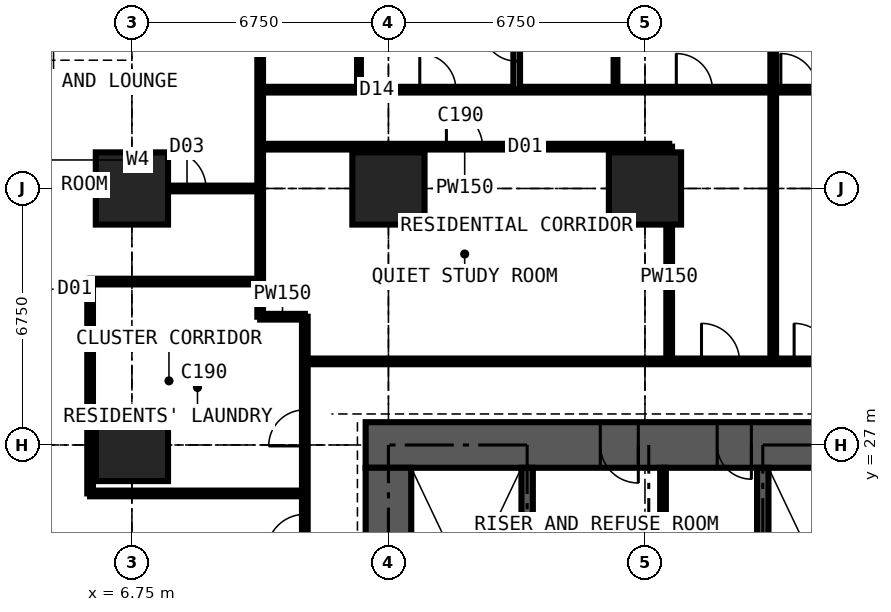
"""IFC4 building model, lengths in metres.
Left out: names, types, materials, properties, quantities, classifications, styles, units other than length and angle.
Written with IfcOpenShell. Run it as: python <this file> out.ifc"""

import sys

from ifc_helpers import new_model, si_unit, direction, frame, frame_2d, origin, origin_2d, place, context, subcontext, project, spatial, rectangle, extrude, element, fill, save


model = new_model("IFC4")
c1 = context("Model", 3, precision=1e-05, world=origin(), true_north=direction((0.0, 1.0)))
c2 = subcontext(c1, "Body", "Model", "MODEL_VIEW")
j1 = project(units=[si_unit("LENGTHUNIT", "METRE"), si_unit("PLANEANGLEUNIT", "RADIAN")], contexts=[c1])
p1 = place(None, origin())
s1 = spatial("IfcSite", under=j1, at=p1, CompositionType="ELEMENT")
p2 = place(p1, origin())
s2 = spatial("IfcBuilding", under=s1, at=p2, CompositionType="ELEMENT")
p3 = place(p2, frame((0.0, 0.0, 21.6)))
s3 = spatial("IfcBuildingStorey", under=s2, at=p3, CompositionType="ELEMENT", Elevation=21.6)
for number, where, z_axis, x_axis in (
    (1, (6.75, 27.0, 0.0), (0.0, 0.0, 1.0), (1.0, 0.0, 0.0)),
    (2, (6.75, 33.75, 0.0), (0.0, 0.0, 1.0), (1.0, 0.0, 0.0)),
    (3, (13.5, 33.75, 0.0), (0.0, 0.0, 1.0), (1.0, 0.0, 0.0)),
    (4, (20.25, 33.75, 0.0), (0.0, 0.0, 1.0), (1.0, 0.0, 0.0)),
):
    element("IfcColumn", number, at=place(p3, frame(where, z_axis=z_axis, x_axis=x_axis)), inside=s3, PredefinedType="COLUMN", context=c2, shape_type="SweptSolid", body=[
        extrude(rectangle(XDim=1.9, YDim=1.9, at=origin_2d()), origin(), (0.0, 0.0, 1.0), 3.6),
    ])
p4 = place(p3, frame((27.6, 27.0, 0.0), z_axis=(0.0, 0.0, 1.0), x_axis=(-1.0, 0.0, 0.0)))
e5 = element("IfcWall", 5, at=p4, inside=s3, PredefinedType="SHEAR", context=c2, shape_type="SweptSolid", body=[
    extrude(rectangle(XDim=14.7, YDim=1.2, at=frame_2d((7.35, 0.0))), origin(), (0.0, 0.0, 1.0), 3.6),
])
p5 = place(p4, frame((4.55, 0.0, 0.0)))
e6 = element("IfcOpeningElement", 6, at=p5, cuts=e5, PredefinedType="OPENING", context=c2, shape_type="SweptSolid", body=[
    extrude(rectangle(XDim=0.9, YDim=2.2, at=frame_2d((0.45, 1.1))), frame((0.0, 0.61, 0.0), z_axis=(0.0, -1.0, 0.0), x_axis=(1.0, 0.0, 0.0)), (0.0, 0.0, 1.0), 1.22),
])
p6 = place(p4, frame((7.525, 0.0, 0.0)))
e7 = element("IfcOpeningElement", 7, at=p6, cuts=e5, PredefinedType="OPENING", context=c2, shape_type="SweptSolid", body=[
    extrude(rectangle(XDim=1.0, YDim=2.2, at=frame_2d((0.5, 1.1))), frame((0.0, 0.61, 0.0), z_axis=(0.0, -1.0, 0.0), x_axis=(1.0, 0.0, 0.0)), (0.0, 0.0, 1.0), 1.22),
])
p7 = place(p3, frame((13.5, 26.4, 0.0), z_axis=(0.0, 0.0, 1.0), x_axis=(0.0, -1.0, 0.0)))
e8 = element("IfcWall", 8, at=p7, inside=s3, PredefinedType="SHEAR", context=c2, shape_type="SweptSolid", body=[
    extrude(rectangle(XDim=12.3, YDim=1.2, at=frame_2d((6.15, 0.0))), origin(), (0.0, 0.0, 1.0), 3.6),
])
p8 = place(p7, frame((7.45, 0.0, 0.0)))
e9 = element("IfcOpeningElement", 9, at=p8, cuts=e8, PredefinedType="OPENING", context=c2, shape_type="SweptSolid", body=[
    extrude(rectangle(XDim=1.2, YDim=2.2, at=frame_2d((0.6, 1.1))), frame((0.0, 0.61, 0.0), z_axis=(0.0, -1.0, 0.0), x_axis=(1.0, 0.0, 0.0)), (0.0, 0.0, 1.0), 1.22),
])
for number, where, z_axis, x_axis in (
    (10, (17.15, 20.3, 0.0), (0.0, 0.0, 1.0), (0.0, 1.0, 0.0)),
    (11, (23.35, 20.3, 0.0), (0.0, 0.0, 1.0), (0.0, 1.0, 0.0)),
):
    element("IfcWall", number, at=place(p3, frame(where, z_axis=z_axis, x_axis=x_axis)), inside=s3, PredefinedType="SHEAR", context=c2, shape_type="SweptSolid", body=[
        extrude(rectangle(XDim=6.1, YDim=0.3, at=frame_2d((3.05, 0.0))), origin(), (0.0, 0.0, 1.0), 3.6),
    ])
p9 = place(p3, frame((20.725, 23.4, 0.0), z_axis=(0.0, 0.0, 1.0), x_axis=(0.0, 1.0, 0.0)))
e12 = element("IfcWall", 12, at=p9, inside=s3, PredefinedType="PARTITIONING", context=c2, shape_type="SweptSolid", body=[
    extrude(rectangle(XDim=3.0, YDim=0.15, at=frame_2d((1.5, 0.0))), origin(), (0.0, 0.0, 1.0), 3.375),
])
p10 = place(p3, frame((-0.734, 33.75, 0.0), z_axis=(0.0, 0.0, 1.0), x_axis=(1.0, 0.0, 0.0)))
e13 = element("IfcWall", 13, at=p10, inside=s3, PredefinedType="PARTITIONING", context=c2, shape_type="SweptSolid", body=[
    extrude(rectangle(XDim=10.859, YDim=0.15, at=frame_2d((5.429, 0.0))), origin(), (0.0, 0.0, 1.0), 2.877),
])
p11 = place(p10, frame((8.434, 0.0, 0.0)))
e14 = element("IfcOpeningElement", 14, at=p11, cuts=e13, PredefinedType="OPENING", context=c2, shape_type="SweptSolid", body=[
    extrude(rectangle(XDim=1.0, YDim=2.2, at=frame_2d((0.5, 1.1))), frame((0.0, 0.085, 0.0), z_axis=(0.0, -1.0, 0.0), x_axis=(1.0, 0.0, 0.0)), (0.0, 0.0, 1.0), 0.17),
])
p12 = place(p3, frame((5.65, 25.725, 0.0), z_axis=(0.0, 0.0, 1.0), x_axis=(0.0, 1.0, 0.0)))
e15 = element("IfcWall", 15, at=p12, inside=s3, PredefinedType="PARTITIONING", context=c2, shape_type="SweptSolid", body=[
    extrude(rectangle(XDim=5.575, YDim=0.15, at=frame_2d((2.788, 0.0))), origin(), (0.0, 0.0, 1.0), 3.375),
])
p13 = place(p3, frame((5.65, 25.725, 0.0), z_axis=(0.0, 0.0, 1.0), x_axis=(1.0, 0.0, 0.0)))
e16 = element("IfcWall", 16, at=p13, inside=s3, PredefinedType="PARTITIONING", context=c2, shape_type="SweptSolid", body=[
    extrude(rectangle(XDim=5.65, YDim=0.15, at=frame_2d((2.825, 0.0))), origin(), (0.0, 0.0, 1.0), 3.375),
])
p14 = place(p3, frame((5.65, 31.3, 0.0), z_axis=(0.0, 0.0, 1.0), x_axis=(1.0, 0.0, 0.0)))
e17 = element("IfcWall", 17, at=p14, inside=s3, PredefinedType="PARTITIONING", context=c2, shape_type="SweptSolid", body=[
    extrude(rectangle(XDim=4.475, YDim=0.15, at=frame_2d((2.238, 0.0))), origin(), (0.0, 0.0, 1.0), 3.375),
])
p15 = place(p3, frame((10.125, 30.375, 0.0), z_axis=(0.0, 0.0, 1.0), x_axis=(0.0, 1.0, 0.0)))
e18 = element("IfcWall", 18, at=p15, inside=s3, PredefinedType="PARTITIONING", context=c2, shape_type="SweptSolid", body=[
    extrude(rectangle(XDim=10.859, YDim=0.15, at=frame_2d((5.429, 0.0))), origin(), (0.0, 0.0, 1.0), 3.375),
])
p16 = place(p3, frame((10.125, 30.375, 0.0), z_axis=(0.0, 0.0, 1.0), x_axis=(1.0, 0.0, 0.0)))
e19 = element("IfcWall", 19, at=p16, inside=s3, PredefinedType="PARTITIONING", context=c2, shape_type="SweptSolid", body=[
    extrude(rectangle(XDim=1.175, YDim=0.15, at=frame_2d((0.587, 0.0))), origin(), (0.0, 0.0, 1.0), 3.375),
])
p17 = place(p3, frame((10.125, 34.85, 0.0), z_axis=(0.0, 0.0, 1.0), x_axis=(1.0, 0.0, 0.0)))
e20 = element("IfcWall", 20, at=p17, inside=s3, PredefinedType="PARTITIONING", context=c2, shape_type="SweptSolid", body=[
    extrude(rectangle(XDim=10.762, YDim=0.15, at=frame_2d((5.381, 0.0))), origin(), (0.0, 0.0, 1.0), 3.375),
])
p18 = place(p17, frame((4.9, 0.0, 0.0)))
e21 = element("IfcOpeningElement", 21, at=p18, cuts=e20, PredefinedType="OPENING", context=c2, shape_type="SweptSolid", body=[
    extrude(rectangle(XDim=0.95, YDim=2.2, at=frame_2d((0.475, 1.1))), frame((0.0, 0.085, 0.0), z_axis=(0.0, -1.0, 0.0), x_axis=(1.0, 0.0, 0.0)), (0.0, 0.0, 1.0), 0.17),
])
p19 = place(p3, frame((10.125, 36.35, 0.0), z_axis=(0.0, 0.0, 1.0), x_axis=(1.0, 0.0, 0.0)))
e22 = element("IfcWall", 22, at=p19, inside=s3, PredefinedType="PARTITIONING", context=c2, shape_type="SweptSolid", body=[
    extrude(rectangle(XDim=23.625, YDim=0.15, at=frame_2d((11.812, 0.0))), origin(), (0.0, 0.0, 1.0), 3.375),
])
p20 = place(p19, frame((21.45, 0.0, 0.0)))
e23 = element("IfcOpeningElement", 23, at=p20, cuts=e22, PredefinedType="OPENING", context=c2, shape_type="SweptSolid", body=[
    extrude(rectangle(XDim=1.0, YDim=2.2, at=frame_2d((0.5, 1.1))), frame((0.0, 0.085, 0.0), z_axis=(0.0, -1.0, 0.0), x_axis=(1.0, 0.0, 0.0)), (0.0, 0.0, 1.0), 0.17),
])
p21 = place(p19, frame((17.125, 0.0, 0.0)))
e24 = element("IfcOpeningElement", 24, at=p21, cuts=e22, PredefinedType="OPENING", context=c2, shape_type="SweptSolid", body=[
    extrude(rectangle(XDim=0.95, YDim=2.2, at=frame_2d((0.475, 1.1))), frame((0.0, 0.085, 0.0), z_axis=(0.0, -1.0, 0.0), x_axis=(1.0, 0.0, 0.0)), (0.0, 0.0, 1.0), 0.17),
])
p22 = place(p19, frame((13.7, 0.0, 0.0)))
e25 = element("IfcOpeningElement", 25, at=p22, cuts=e22, PredefinedType="OPENING", context=c2, shape_type="SweptSolid", body=[
    extrude(rectangle(XDim=0.95, YDim=2.2, at=frame_2d((0.475, 1.1))), frame((0.0, 0.085, 0.0), z_axis=(0.0, -1.0, 0.0), x_axis=(1.0, 0.0, 0.0)), (0.0, 0.0, 1.0), 0.17),
])
p23 = place(p19, frame((4.2, 0.0, 0.0)))
e26 = element("IfcOpeningElement", 26, at=p23, cuts=e22, PredefinedType="OPENING", context=c2, shape_type="SweptSolid", body=[
    extrude(rectangle(XDim=0.95, YDim=2.2, at=frame_2d((0.475, 1.1))), frame((0.0, 0.085, 0.0), z_axis=(0.0, -1.0, 0.0), x_axis=(1.0, 0.0, 0.0)), (0.0, 0.0, 1.0), 0.17),
])
p24 = place(p19, frame((10.95, 0.0, 0.0)))
e27 = element("IfcOpeningElement", 27, at=p24, cuts=e22, PredefinedType="OPENING", context=c2, shape_type="SweptSolid", body=[
    extrude(rectangle(XDim=0.95, YDim=2.2, at=frame_2d((0.475, 1.1))), frame((0.0, 0.085, 0.0), z_axis=(0.0, -1.0, 0.0), x_axis=(1.0, 0.0, 0.0)), (0.0, 0.0, 1.0), 0.17),
])
p25 = place(p3, frame((11.3, 11.3, 0.0), z_axis=(0.0, 0.0, 1.0), x_axis=(0.0, 1.0, 0.0)))
e28 = element("IfcWall", 28, at=p25, inside=s3, PredefinedType="PARTITIONING", context=c2, shape_type="SweptSolid", body=[
    extrude(rectangle(XDim=19.075, YDim=0.15, at=frame_2d((9.538, 0.0))), origin(), (0.0, 0.0, 1.0), 3.375),
])
p26 = place(p25, frame((12.875, 0.0, 0.0)))
e29 = element("IfcOpeningElement", 29, at=p26, cuts=e28, PredefinedType="OPENING", context=c2, shape_type="SweptSolid", body=[
    extrude(rectangle(XDim=1.0, YDim=2.2, at=frame_2d((0.5, 1.1))), frame((0.0, 0.085, 0.0), z_axis=(0.0, -1.0, 0.0), x_axis=(1.0, 0.0, 0.0)), (0.0, 0.0, 1.0), 0.17),
])
p27 = place(p25, frame((10.438, 0.0, 0.0)))
e30 = element("IfcOpeningElement", 30, at=p27, cuts=e28, PredefinedType="OPENING", context=c2, shape_type="SweptSolid", body=[
    extrude(rectangle(XDim=1.0, YDim=2.2, at=frame_2d((0.5, 1.1))), frame((0.0, 0.085, 0.0), z_axis=(0.0, -1.0, 0.0), x_axis=(1.0, 0.0, 0.0)), (0.0, 0.0, 1.0), 0.17),
])
p28 = place(p25, frame((15.675, 0.0, 0.0)))
e31 = element("IfcOpeningElement", 31, at=p28, cuts=e28, PredefinedType="OPENING", context=c2, shape_type="SweptSolid", body=[
    extrude(rectangle(XDim=0.95, YDim=2.2, at=frame_2d((0.475, 1.1))), frame((0.0, 0.085, 0.0), z_axis=(0.0, -1.0, 0.0), x_axis=(1.0, 0.0, 0.0)), (0.0, 0.0, 1.0), 0.17),
])
p29 = place(p3, frame((11.3, 29.2, 0.0), z_axis=(0.0, 0.0, 1.0), x_axis=(1.0, 0.0, 0.0)))
e32 = element("IfcWall", 32, at=p29, inside=s3, PredefinedType="PARTITIONING", context=c2, shape_type="SweptSolid", body=[
    extrude(rectangle(XDim=19.075, YDim=0.15, at=frame_2d((9.538, 0.0))), origin(), (0.0, 0.0, 1.0), 3.375),
])
p30 = place(p29, frame((12.875, 0.0, 0.0)))
e33 = element("IfcOpeningElement", 33, at=p30, cuts=e32, PredefinedType="OPENING", context=c2, shape_type="SweptSolid", body=[
    extrude(rectangle(XDim=1.0, YDim=2.2, at=frame_2d((0.5, 1.1))), frame((0.0, 0.085, 0.0), z_axis=(0.0, -1.0, 0.0), x_axis=(1.0, 0.0, 0.0)), (0.0, 0.0, 1.0), 0.17),
])
p31 = place(p29, frame((10.438, 0.0, 0.0)))
e34 = element("IfcOpeningElement", 34, at=p31, cuts=e32, PredefinedType="OPENING", context=c2, shape_type="SweptSolid", body=[
    extrude(rectangle(XDim=1.0, YDim=2.2, at=frame_2d((0.5, 1.1))), frame((0.0, 0.085, 0.0), z_axis=(0.0, -1.0, 0.0), x_axis=(1.0, 0.0, 0.0)), (0.0, 0.0, 1.0), 0.17),
])
p32 = place(p29, frame((14.875, 0.0, 0.0)))
e35 = element("IfcOpeningElement", 35, at=p32, cuts=e32, PredefinedType="OPENING", context=c2, shape_type="SweptSolid", body=[
    extrude(rectangle(XDim=0.95, YDim=2.2, at=frame_2d((0.475, 1.1))), frame((0.0, 0.085, 0.0), z_axis=(0.0, -1.0, 0.0), x_axis=(1.0, 0.0, 0.0)), (0.0, 0.0, 1.0), 0.17),
])
p33 = place(p3, frame((12.725, 36.35, 0.0), z_axis=(0.0, 0.0, 1.0), x_axis=(0.0, 1.0, 0.0)))
e36 = element("IfcWall", 36, at=p33, inside=s3, PredefinedType="PARTITIONING", context=c2, shape_type="SweptSolid", body=[
    extrude(rectangle(XDim=2.4, YDim=0.1, at=frame_2d((1.2, 0.0))), origin(), (0.0, 0.0, 1.0), 3.375),
])
p34 = place(p3, frame((16.875, 36.35, 0.0), z_axis=(0.0, 0.0, 1.0), x_axis=(0.0, 1.0, 0.0)))
e37 = element("IfcWall", 37, at=p34, inside=s3, PredefinedType="PARTITIONING", context=c2, shape_type="SweptSolid", body=[
    extrude(rectangle(XDim=4.884, YDim=0.175, at=frame_2d((2.442, 0.0))), origin(), (0.0, 0.0, 1.0), 3.375),
])
p35 = place(p34, frame((0.75, 0.0, 0.0)))
e38 = element("IfcOpeningElement", 38, at=p35, cuts=e37, PredefinedType="OPENING", context=c2, shape_type="SweptSolid", body=[
    extrude(rectangle(XDim=0.9, YDim=2.2, at=frame_2d((0.45, 1.1))), frame((0.0, 0.097, 0.0), z_axis=(0.0, -1.0, 0.0), x_axis=(1.0, 0.0, 0.0)), (0.0, 0.0, 1.0), 0.195),
])
p36 = place(p3, frame((19.475, 36.35, 0.0), z_axis=(0.0, 0.0, 1.0), x_axis=(0.0, 1.0, 0.0)))
e39 = element("IfcWall", 39, at=p36, inside=s3, PredefinedType="PARTITIONING", context=c2, shape_type="SweptSolid", body=[
    extrude(rectangle(XDim=2.4, YDim=0.1, at=frame_2d((1.2, 0.0))), origin(), (0.0, 0.0, 1.0), 3.375),
])
p37 = place(p3, frame((20.887, 29.2, 0.0), z_axis=(0.0, 0.0, 1.0), x_axis=(0.0, 1.0, 0.0)))
e40 = element("IfcWall", 40, at=p37, inside=s3, PredefinedType="PARTITIONING", context=c2, shape_type="SweptSolid", body=[
    extrude(rectangle(XDim=5.65, YDim=0.15, at=frame_2d((2.825, 0.0))), origin(), (0.0, 0.0, 1.0), 3.375),
])
p38 = place(p3, frame((23.625, 29.2, 0.0), z_axis=(0.0, 0.0, 1.0), x_axis=(0.0, 1.0, 0.0)))
e41 = element("IfcWall", 41, at=p38, inside=s3, PredefinedType="PARTITIONING", context=c2, shape_type="SweptSolid", body=[
    extrude(rectangle(XDim=12.034, YDim=0.15, at=frame_2d((6.017, 0.0))), origin(), (0.0, 0.0, 1.0), 3.375),
])
p39 = place(p5, origin())
e42 = element("IfcDoor", 42, at=p39, inside=s3, OperationType="SINGLE_SWING_LEFT", PredefinedType="DOOR", context=c2, shape_type="SweptSolid", body=[
    extrude(rectangle(XDim=0.9, YDim=2.2, at=frame_2d((0.45, 1.1))), frame((0.0, 0.4, 0.0), z_axis=(0.0, -1.0, 0.0), x_axis=(1.0, 0.0, 0.0)), (0.0, 0.0, 1.0), 0.8),
])
fill(e6, e42)
p40 = place(p6, origin())
e43 = element("IfcDoor", 43, at=p40, inside=s3, OperationType="SINGLE_SWING_LEFT", PredefinedType="DOOR", context=c2, shape_type="SweptSolid", body=[
    extrude(rectangle(XDim=1.0, YDim=2.2, at=frame_2d((0.5, 1.1))), frame((0.0, 0.025, 0.0), z_axis=(0.0, -1.0, 0.0), x_axis=(1.0, 0.0, 0.0)), (0.0, 0.0, 1.0), 0.05),
])
fill(e7, e43)
p41 = place(p22, origin())
e44 = element("IfcDoor", 44, at=p41, inside=s3, OperationType="SINGLE_SWING_LEFT", PredefinedType="DOOR", context=c2, shape_type="SweptSolid", body=[
    extrude(rectangle(XDim=0.95, YDim=2.2, at=frame_2d((0.475, 1.1))), frame((0.0, 0.025, 0.0), z_axis=(0.0, -1.0, 0.0), x_axis=(1.0, 0.0, 0.0)), (0.0, 0.0, 1.0), 0.05),
])
fill(e25, e44)
p42 = place(p30, origin())
e45 = element("IfcDoor", 45, at=p42, inside=s3, OperationType="SINGLE_SWING_LEFT", PredefinedType="DOOR", context=c2, shape_type="SweptSolid", body=[
    extrude(rectangle(XDim=1.0, YDim=2.2, at=frame_2d((0.5, 1.1))), frame((0.0, 0.025, 0.0), z_axis=(0.0, -1.0, 0.0), x_axis=(1.0, 0.0, 0.0)), (0.0, 0.0, 1.0), 0.05),
])
fill(e33, e45)
p43 = place(p23, origin())
e46 = element("IfcDoor", 46, at=p43, inside=s3, OperationType="SINGLE_SWING_LEFT", PredefinedType="DOOR", context=c2, shape_type="SweptSolid", body=[
    extrude(rectangle(XDim=0.95, YDim=2.2, at=frame_2d((0.475, 1.1))), frame((0.0, 0.025, 0.0), z_axis=(0.0, -1.0, 0.0), x_axis=(1.0, 0.0, 0.0)), (0.0, 0.0, 1.0), 0.05),
])
fill(e26, e46)
p44 = place(p24, origin())
e47 = element("IfcDoor", 47, at=p44, inside=s3, OperationType="SINGLE_SWING_LEFT", PredefinedType="DOOR", context=c2, shape_type="SweptSolid", body=[
    extrude(rectangle(XDim=0.95, YDim=2.2, at=frame_2d((0.475, 1.1))), frame((0.0, 0.025, 0.0), z_axis=(0.0, -1.0, 0.0), x_axis=(1.0, 0.0, 0.0)), (0.0, 0.0, 1.0), 0.05),
])
fill(e27, e47)
p45 = place(p35, origin())
e48 = element("IfcDoor", 48, at=p45, inside=s3, OperationType="SINGLE_SWING_RIGHT", PredefinedType="DOOR", context=c2, shape_type="SweptSolid", body=[
    extrude(rectangle(XDim=0.9, YDim=2.2, at=frame_2d((0.45, 1.1))), frame((0.0, 0.025, 0.0), z_axis=(0.0, -1.0, 0.0), x_axis=(1.0, 0.0, 0.0)), (0.0, 0.0, 1.0), 0.05),
])
fill(e38, e48)
p46 = place(p31, origin())
e49 = element("IfcDoor", 49, at=p46, inside=s3, OperationType="SINGLE_SWING_LEFT", PredefinedType="DOOR", context=c2, shape_type="SweptSolid", body=[
    extrude(rectangle(XDim=1.0, YDim=2.2, at=frame_2d((0.5, 1.1))), frame((0.0, 0.025, 0.0), z_axis=(0.0, -1.0, 0.0), x_axis=(1.0, 0.0, 0.0)), (0.0, 0.0, 1.0), 0.05),
])
fill(e34, e49)
p47 = place(p18, origin())
e50 = element("IfcDoor", 50, at=p47, inside=s3, OperationType="SINGLE_SWING_LEFT", PredefinedType="DOOR", context=c2, shape_type="SweptSolid", body=[
    extrude(rectangle(XDim=0.95, YDim=2.2, at=frame_2d((0.475, 1.1))), frame((0.0, 0.025, 0.0), z_axis=(0.0, -1.0, 0.0), x_axis=(1.0, 0.0, 0.0)), (0.0, 0.0, 1.0), 0.05),
])
fill(e21, e50)
p48 = place(p11, origin())
e51 = element("IfcDoor", 51, at=p48, inside=s3, OperationType="SINGLE_SWING_LEFT", PredefinedType="DOOR", context=c2, shape_type="SweptSolid", body=[
    extrude(rectangle(XDim=1.0, YDim=2.2, at=frame_2d((0.5, 1.1))), frame((0.0, 0.025, 0.0), z_axis=(0.0, -1.0, 0.0), x_axis=(1.0, 0.0, 0.0)), (0.0, 0.0, 1.0), 0.05),
])
fill(e14, e51)
p49 = place(p26, origin())
e52 = element("IfcDoor", 52, at=p49, inside=s3, OperationType="SINGLE_SWING_LEFT", PredefinedType="DOOR", context=c2, shape_type="SweptSolid", body=[
    extrude(rectangle(XDim=1.0, YDim=2.2, at=frame_2d((0.5, 1.1))), frame((0.0, 0.025, 0.0), z_axis=(0.0, -1.0, 0.0), x_axis=(1.0, 0.0, 0.0)), (0.0, 0.0, 1.0), 0.05),
])
fill(e29, e52)
p50 = place(p28, origin())
e53 = element("IfcDoor", 53, at=p50, inside=s3, OperationType="SINGLE_SWING_LEFT", PredefinedType="DOOR", context=c2, shape_type="SweptSolid", body=[
    extrude(rectangle(XDim=0.95, YDim=2.2, at=frame_2d((0.475, 1.1))), frame((0.0, 0.025, 0.0), z_axis=(0.0, -1.0, 0.0), x_axis=(1.0, 0.0, 0.0)), (0.0, 0.0, 1.0), 0.05),
])
fill(e31, e53)
save(model, sys.argv[1])
